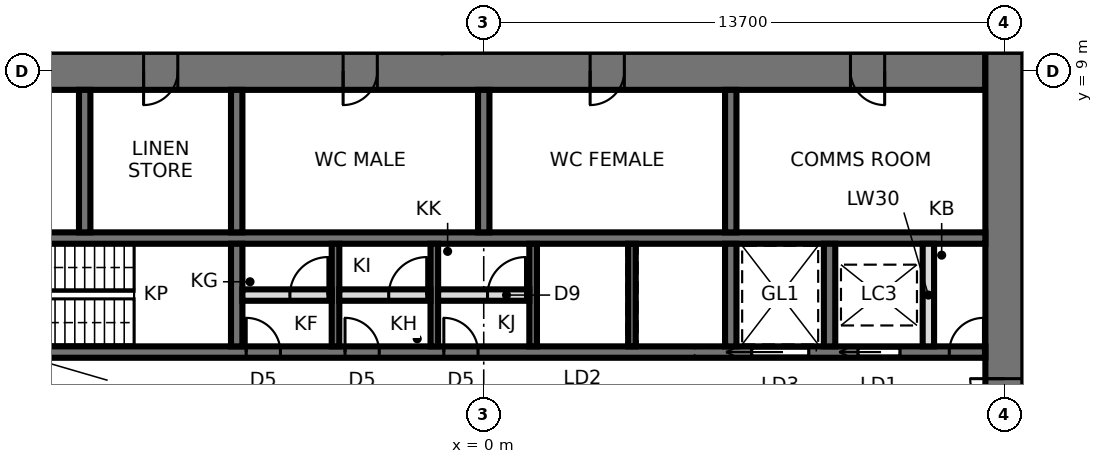
"""IFC4 building model, lengths in metres.
Left out: names, types, materials, properties, quantities, classifications, styles, units other than length and angle.
Written with IfcOpenShell. Run it as: python <this file> out.ifc"""

import sys

from ifc_helpers import new_model, si_unit, direction, frame, frame_2d, origin, place, context, subcontext, project, spatial, rectangle, extrude, element, fill, save


model = new_model("IFC4")
c1 = context("Model", 3, precision=1e-05, world=origin(), true_north=direction((0.0, 1.0)))
c2 = subcontext(c1, "Body", "Model", "MODEL_VIEW")
j1 = project(units=[si_unit("LENGTHUNIT", "METRE"), si_unit("PLANEANGLEUNIT", "RADIAN")], contexts=[c1])
p1 = place(None, origin())
s1 = spatial("IfcSite", under=j1, at=p1, CompositionType="ELEMENT")
p2 = place(p1, origin())
s2 = spatial("IfcBuilding", under=s1, at=p2, CompositionType="ELEMENT")
p3 = place(p2, frame((0.0, 0.0, 187.7)))
s3 = spatial("IfcBuildingStorey", under=s2, at=p3, CompositionType="ELEMENT", Elevation=187.7)
p4 = place(p3, frame((13.2, 9.0, 0.0), z_axis=(0.0, 0.0, 1.0), x_axis=(-1.0, 0.0, 0.0)))
e1 = element("IfcWall", 1, at=p4, inside=s3, PredefinedType="SHEAR", context=c2, shape_type="SweptSolid", body=[
    extrude(rectangle(XDim=26.4, YDim=1.0, at=frame_2d((13.2, 0.0))), origin(), (0.0, 0.0, 1.0), 3.9),
])
p5 = place(p4, frame((2.65, 0.0, 0.0)))
e2 = element("IfcOpeningElement", 2, at=p5, cuts=e1, PredefinedType="OPENING", context=c2, shape_type="SweptSolid", body=[
    extrude(rectangle(XDim=0.9, YDim=2.1, at=frame_2d((0.45, 1.05))), frame((0.0, 0.51, 0.0), z_axis=(0.0, -1.0, 0.0), x_axis=(1.0, 0.0, 0.0)), (0.0, 0.0, 1.0), 1.02),
])
p6 = place(p4, frame((9.5, 0.0, 0.0)))
e3 = element("IfcOpeningElement", 3, at=p6, cuts=e1, PredefinedType="OPENING", context=c2, shape_type="SweptSolid", body=[
    extrude(rectangle(XDim=0.9, YDim=2.1, at=frame_2d((0.45, 1.05))), frame((0.0, 0.51, 0.0), z_axis=(0.0, -1.0, 0.0), x_axis=(1.0, 0.0, 0.0)), (0.0, 0.0, 1.0), 1.02),
])
p7 = place(p4, frame((16.0, 0.0, 0.0)))
e4 = element("IfcOpeningElement", 4, at=p7, cuts=e1, PredefinedType="OPENING", context=c2, shape_type="SweptSolid", body=[
    extrude(rectangle(XDim=0.9, YDim=2.1, at=frame_2d((0.45, 1.05))), frame((0.0, 0.51, 0.0), z_axis=(0.0, -1.0, 0.0), x_axis=(1.0, 0.0, 0.0)), (0.0, 0.0, 1.0), 1.02),
])
p8 = place(p4, frame((21.25, 0.0, 0.0)))
e5 = element("IfcOpeningElement", 5, at=p8, cuts=e1, PredefinedType="OPENING", context=c2, shape_type="SweptSolid", body=[
    extrude(rectangle(XDim=0.9, YDim=2.1, at=frame_2d((0.45, 1.05))), frame((0.0, 0.51, 0.0), z_axis=(0.0, -1.0, 0.0), x_axis=(1.0, 0.0, 0.0)), (0.0, 0.0, 1.0), 1.02),
])
p9 = place(p4, frame((24.8, 0.0, 0.0)))
e6 = element("IfcOpeningElement", 6, at=p9, cuts=e1, PredefinedType="OPENING", context=c2, shape_type="SweptSolid", body=[
    extrude(rectangle(XDim=1.0, YDim=2.1, at=frame_2d((0.5, 1.05))), frame((0.0, 0.51, 0.0), z_axis=(0.0, -1.0, 0.0), x_axis=(1.0, 0.0, 0.0)), (0.0, 0.0, 1.0), 1.02),
])
p10 = place(p3, frame((13.7, -9.5, 0.0), z_axis=(0.0, 0.0, 1.0), x_axis=(0.0, 1.0, 0.0)))
e7 = element("IfcWall", 7, at=p10, inside=s3, PredefinedType="SHEAR", context=c2, shape_type="SweptSolid", body=[
    extrude(rectangle(XDim=19.0, YDim=1.0, at=frame_2d((9.5, 0.0))), origin(), (0.0, 0.0, 1.0), 3.9),
])
p11 = place(p10, frame((8.6, 0.0, 0.0)))
e8 = element("IfcOpeningElement", 8, at=p11, cuts=e7, PredefinedType="OPENING", context=c2, shape_type="SweptSolid", body=[
    extrude(rectangle(XDim=1.8, YDim=2.4, at=frame_2d((0.9, 1.2))), frame((0.0, 0.51, 0.0), z_axis=(0.0, -1.0, 0.0), x_axis=(1.0, 0.0, 0.0)), (0.0, 0.0, 1.0), 1.02),
])
p12 = place(p3, frame((-13.2, 1.6, 0.0), z_axis=(0.0, 0.0, 1.0), x_axis=(1.0, 0.0, 0.0)))
e9 = element("IfcWall", 9, at=p12, inside=s3, PredefinedType="SHEAR", context=c2, shape_type="SweptSolid", body=[
    extrude(rectangle(XDim=26.4, YDim=0.3, at=frame_2d((13.2, 0.0))), origin(), (0.0, 0.0, 1.0), 3.9),
])
p13 = place(p12, frame((0.25, 0.0, 0.0)))
e10 = element("IfcOpeningElement", 10, at=p13, cuts=e9, PredefinedType="OPENING", context=c2, shape_type="SweptSolid", body=[
    extrude(rectangle(XDim=1.0, YDim=2.1, at=frame_2d((0.5, 1.05))), frame((0.0, 0.16, 0.0), z_axis=(0.0, -1.0, 0.0), x_axis=(1.0, 0.0, 0.0)), (0.0, 0.0, 1.0), 0.32),
])
p14 = place(p12, frame((23.05, 0.0, 0.0)))
e11 = element("IfcOpeningElement", 11, at=p14, cuts=e9, PredefinedType="OPENING", context=c2, shape_type="SweptSolid", body=[
    extrude(rectangle(XDim=1.1, YDim=2.3, at=frame_2d((0.55, 1.15))), frame((0.0, 0.16, 0.0), z_axis=(0.0, -1.0, 0.0), x_axis=(1.0, 0.0, 0.0)), (0.0, 0.0, 1.0), 0.32),
])
p15 = place(p12, frame((20.25, 0.0, 0.0)))
e12 = element("IfcOpeningElement", 12, at=p15, cuts=e9, PredefinedType="OPENING", context=c2, shape_type="SweptSolid", body=[
    extrude(rectangle(XDim=1.5, YDim=2.4, at=frame_2d((0.75, 1.2))), frame((0.0, 0.16, 0.0), z_axis=(0.0, -1.0, 0.0), x_axis=(1.0, 0.0, 0.0)), (0.0, 0.0, 1.0), 0.32),
])
p16 = place(p12, frame((6.95, 0.0, 0.0)))
e13 = element("IfcOpeningElement", 13, at=p16, cuts=e9, PredefinedType="OPENING", context=c2, shape_type="SweptSolid", body=[
    extrude(rectangle(XDim=0.9, YDim=2.1, at=frame_2d((0.45, 1.05))), frame((0.0, 0.16, 0.0), z_axis=(0.0, -1.0, 0.0), x_axis=(1.0, 0.0, 0.0)), (0.0, 0.0, 1.0), 0.32),
])
p17 = place(p12, frame((9.55, 0.0, 0.0)))
e14 = element("IfcOpeningElement", 14, at=p17, cuts=e9, PredefinedType="OPENING", context=c2, shape_type="SweptSolid", body=[
    extrude(rectangle(XDim=0.9, YDim=2.1, at=frame_2d((0.45, 1.05))), frame((0.0, 0.16, 0.0), z_axis=(0.0, -1.0, 0.0), x_axis=(1.0, 0.0, 0.0)), (0.0, 0.0, 1.0), 0.32),
])
p18 = place(p12, frame((12.15, 0.0, 0.0)))
e15 = element("IfcOpeningElement", 15, at=p18, cuts=e9, PredefinedType="OPENING", context=c2, shape_type="SweptSolid", body=[
    extrude(rectangle(XDim=0.9, YDim=2.1, at=frame_2d((0.45, 1.05))), frame((0.0, 0.16, 0.0), z_axis=(0.0, -1.0, 0.0), x_axis=(1.0, 0.0, 0.0)), (0.0, 0.0, 1.0), 0.32),
])
p19 = place(p12, frame((25.45, 0.0, 0.0)))
e16 = element("IfcOpeningElement", 16, at=p19, cuts=e9, PredefinedType="OPENING", context=c2, shape_type="SweptSolid", body=[
    extrude(rectangle(XDim=0.9, YDim=2.1, at=frame_2d((0.45, 1.05))), frame((0.0, 0.16, 0.0), z_axis=(0.0, -1.0, 0.0), x_axis=(1.0, 0.0, 0.0)), (0.0, 0.0, 1.0), 0.32),
])
p20 = place(p3, frame((-13.2, 4.6, 0.0), z_axis=(0.0, 0.0, 1.0), x_axis=(1.0, 0.0, 0.0)))
e17 = element("IfcWall", 17, at=p20, inside=s3, PredefinedType="SHEAR", context=c2, shape_type="SweptSolid", body=[
    extrude(rectangle(XDim=26.4, YDim=0.3, at=frame_2d((13.2, 0.0))), origin(), (0.0, 0.0, 1.0), 3.9),
])
p21 = place(p3, frame((-6.5, 1.75, 0.0), z_axis=(0.0, 0.0, 1.0), x_axis=(0.0, 1.0, 0.0)))
e18 = element("IfcWall", 18, at=p21, inside=s3, PredefinedType="SHEAR", context=c2, shape_type="SweptSolid", body=[
    extrude(rectangle(XDim=2.7, YDim=0.3, at=frame_2d((1.35, 0.0))), origin(), (0.0, 0.0, 1.0), 3.9),
])
p22 = place(p3, frame((-6.5, 4.75, 0.0), z_axis=(0.0, 0.0, 1.0), x_axis=(0.0, 1.0, 0.0)))
e19 = element("IfcWall", 19, at=p22, inside=s3, PredefinedType="SHEAR", context=c2, shape_type="SweptSolid", body=[
    extrude(rectangle(XDim=3.75, YDim=0.3, at=frame_2d((1.875, 0.0))), origin(), (0.0, 0.0, 1.0), 3.9),
])
p23 = place(p3, frame((6.5, 1.75, 0.0), z_axis=(0.0, 0.0, 1.0), x_axis=(0.0, 1.0, 0.0)))
e20 = element("IfcWall", 20, at=p23, inside=s3, PredefinedType="SHEAR", context=c2, shape_type="SweptSolid", body=[
    extrude(rectangle(XDim=2.7, YDim=0.3, at=frame_2d((1.35, 0.0))), origin(), (0.0, 0.0, 1.0), 3.9),
])
p24 = place(p3, frame((6.5, 4.75, 0.0), z_axis=(0.0, 0.0, 1.0), x_axis=(0.0, 1.0, 0.0)))
e21 = element("IfcWall", 21, at=p24, inside=s3, PredefinedType="SHEAR", context=c2, shape_type="SweptSolid", body=[
    extrude(rectangle(XDim=3.75, YDim=0.3, at=frame_2d((1.875, 0.0))), origin(), (0.0, 0.0, 1.0), 3.9),
])
for number, where, z_axis, x_axis in (
    (22, (-3.9, 1.75, 0.0), (0.0, 0.0, 1.0), (0.0, 1.0, 0.0)),
    (23, (-1.3, 1.75, 0.0), (0.0, 0.0, 1.0), (0.0, 1.0, 0.0)),
    (24, (1.3, 1.75, 0.0), (0.0, 0.0, 1.0), (0.0, 1.0, 0.0)),
    (25, (3.9, 1.75, 0.0), (0.0, 0.0, 1.0), (0.0, 1.0, 0.0)),
):
    element("IfcWall", number, at=place(p3, frame(where, z_axis=z_axis, x_axis=x_axis)), inside=s3, PredefinedType="SHEAR", context=c2, shape_type="SweptSolid", body=[
        extrude(rectangle(XDim=2.7, YDim=0.2, at=frame_2d((1.35, 0.0))), origin(), (0.0, 0.0, 1.0), 3.9),
    ])
for number, where, z_axis, x_axis in (
    (26, (0.0, 4.75, 0.0), (0.0, 0.0, 1.0), (0.0, 1.0, 0.0)),
    (27, (-10.5, 4.75, 0.0), (0.0, 0.0, 1.0), (0.0, 1.0, 0.0)),
):
    element("IfcWall", number, at=place(p3, frame(where, z_axis=z_axis, x_axis=x_axis)), inside=s3, PredefinedType="SHEAR", context=c2, shape_type="SweptSolid", body=[
        extrude(rectangle(XDim=3.75, YDim=0.3, at=frame_2d((1.875, 0.0))), origin(), (0.0, 0.0, 1.0), 3.9),
    ])
p25 = place(p3, frame((9.1, 1.75, 0.0), z_axis=(0.0, 0.0, 1.0), x_axis=(0.0, 1.0, 0.0)))
e28 = element("IfcWall", 28, at=p25, inside=s3, PredefinedType="SHEAR", context=c2, shape_type="SweptSolid", body=[
    extrude(rectangle(XDim=2.7, YDim=0.3, at=frame_2d((1.35, 0.0))), origin(), (0.0, 0.0, 1.0), 3.9),
])
p26 = place(p3, frame((-6.35, 3.1, 0.0), z_axis=(0.0, 0.0, 1.0), x_axis=(1.0, 0.0, 0.0)))
e29 = element("IfcWall", 29, at=p26, inside=s3, PredefinedType="PARTITIONING", context=c2, shape_type="SweptSolid", body=[
    extrude(rectangle(XDim=2.35, YDim=0.3, at=frame_2d((1.175, 0.0))), origin(), (0.0, 0.0, 1.0), 3.74),
])
p27 = place(p26, frame((1.25, 0.0, 0.0)))
e30 = element("IfcOpeningElement", 30, at=p27, cuts=e29, PredefinedType="OPENING", context=c2, shape_type="SweptSolid", body=[
    extrude(rectangle(XDim=1.0, YDim=2.4, at=frame_2d((0.5, 1.2))), frame((0.0, 0.16, 0.0), z_axis=(0.0, -1.0, 0.0), x_axis=(1.0, 0.0, 0.0)), (0.0, 0.0, 1.0), 0.32),
])
p28 = place(p3, frame((-3.8, 3.1, 0.0), z_axis=(0.0, 0.0, 1.0), x_axis=(1.0, 0.0, 0.0)))
e31 = element("IfcWall", 31, at=p28, inside=s3, PredefinedType="PARTITIONING", context=c2, shape_type="SweptSolid", body=[
    extrude(rectangle(XDim=2.4, YDim=0.3, at=frame_2d((1.2, 0.0))), origin(), (0.0, 0.0, 1.0), 3.74),
])
p29 = place(p28, frame((1.3, 0.0, 0.0)))
e32 = element("IfcOpeningElement", 32, at=p29, cuts=e31, PredefinedType="OPENING", context=c2, shape_type="SweptSolid", body=[
    extrude(rectangle(XDim=1.0, YDim=2.4, at=frame_2d((0.5, 1.2))), frame((0.0, 0.16, 0.0), z_axis=(0.0, -1.0, 0.0), x_axis=(1.0, 0.0, 0.0)), (0.0, 0.0, 1.0), 0.32),
])
p30 = place(p3, frame((-1.2, 3.1, 0.0), z_axis=(0.0, 0.0, 1.0), x_axis=(1.0, 0.0, 0.0)))
e33 = element("IfcWall", 33, at=p30, inside=s3, PredefinedType="PARTITIONING", context=c2, shape_type="SweptSolid", body=[
    extrude(rectangle(XDim=2.4, YDim=0.3, at=frame_2d((1.2, 0.0))), origin(), (0.0, 0.0, 1.0), 3.74),
])
p31 = place(p30, frame((1.3, 0.0, 0.0)))
e34 = element("IfcOpeningElement", 34, at=p31, cuts=e33, PredefinedType="OPENING", context=c2, shape_type="SweptSolid", body=[
    extrude(rectangle(XDim=1.0, YDim=2.4, at=frame_2d((0.5, 1.2))), frame((0.0, 0.16, 0.0), z_axis=(0.0, -1.0, 0.0), x_axis=(1.0, 0.0, 0.0)), (0.0, 0.0, 1.0), 0.32),
])
p32 = place(p3, frame((11.7, 1.75, 0.0), z_axis=(0.0, 0.0, 1.0), x_axis=(0.0, 1.0, 0.0)))
e35 = element("IfcWall", 35, at=p32, inside=s3, PredefinedType="SOLIDWALL", context=c2, shape_type="SweptSolid", body=[
    extrude(rectangle(XDim=2.7, YDim=0.3, at=frame_2d((1.35, 0.0))), origin(), (0.0, 0.0, 1.0), 3.74),
])
p33 = place(p3, frame((-0.999, 9.5, 0.0), z_axis=(0.0, 0.0, 1.0), x_axis=(-0.10451834001, 0.994522959313, 0.0)))
e36 = element("IfcWall", 36, at=p33, inside=s3, PredefinedType="PARTITIONING", context=c2, shape_type="SweptSolid", body=[
    extrude(rectangle(XDim=10.766, YDim=0.12, at=frame_2d((5.383, 0.0))), origin(), (0.0, 0.0, 1.0), 3.74),
])
p34 = place(p11, origin())
e37 = element("IfcDoor", 37, at=p34, inside=s3, OperationType="DOUBLE_DOOR_SINGLE_SWING", PredefinedType="DOOR", context=c2, shape_type="SweptSolid", body=[
    extrude(rectangle(XDim=1.72, YDim=2.36, at=frame_2d((0.9, 1.18))), frame((0.0, 0.025, 0.0), z_axis=(0.0, -1.0, 0.0), x_axis=(1.0, 0.0, 0.0)), (0.0, 0.0, 1.0), 0.05),
    extrude(rectangle(XDim=0.04, YDim=2.4, at=frame_2d((0.02, 1.2))), frame((0.0, 0.25, 0.0), z_axis=(0.0, -1.0, 0.0), x_axis=(1.0, 0.0, 0.0)), (0.0, 0.0, 1.0), 0.5),
    extrude(rectangle(XDim=0.04, YDim=2.4, at=frame_2d((1.78, 1.2))), frame((0.0, 0.25, 0.0), z_axis=(0.0, -1.0, 0.0), x_axis=(1.0, 0.0, 0.0)), (0.0, 0.0, 1.0), 0.5),
    extrude(rectangle(XDim=1.72, YDim=0.04, at=frame_2d((0.9, 2.38))), frame((0.0, 0.25, 0.0), z_axis=(0.0, -1.0, 0.0), x_axis=(1.0, 0.0, 0.0)), (0.0, 0.0, 1.0), 0.5),
])
fill(e8, e37)
p35 = place(p14, origin())
e38 = element("IfcDoor", 38, at=p35, inside=s3, OperationType="SLIDING_TO_LEFT", PredefinedType="DOOR", context=c2, shape_type="SweptSolid", body=[
    extrude(rectangle(XDim=1.1, YDim=2.3, at=frame_2d((0.55, 1.15))), frame((0.0, 0.025, 0.0), z_axis=(0.0, -1.0, 0.0), x_axis=(1.0, 0.0, 0.0)), (0.0, 0.0, 1.0), 0.05),
])
fill(e11, e38)
p36 = place(p15, origin())
e39 = element("IfcDoor", 39, at=p36, inside=s3, OperationType="SLIDING_TO_LEFT", PredefinedType="DOOR", context=c2, shape_type="SweptSolid", body=[
    extrude(rectangle(XDim=1.5, YDim=2.4, at=frame_2d((0.75, 1.2))), frame((0.0, 0.025, 0.0), z_axis=(0.0, -1.0, 0.0), x_axis=(1.0, 0.0, 0.0)), (0.0, 0.0, 1.0), 0.05),
])
fill(e12, e39)
p37 = place(p27, origin())
e40 = element("IfcDoor", 40, at=p37, inside=s3, OperationType="SINGLE_SWING_RIGHT", PredefinedType="DOOR", context=c2, shape_type="SweptSolid", body=[
    extrude(rectangle(XDim=1.0, YDim=2.4, at=frame_2d((0.5, 1.2))), frame((0.0, 0.025, 0.0), z_axis=(0.0, -1.0, 0.0), x_axis=(1.0, 0.0, 0.0)), (0.0, 0.0, 1.0), 0.05),
])
fill(e30, e40)
p38 = place(p16, origin())
e41 = element("IfcDoor", 41, at=p38, inside=s3, OperationType="SINGLE_SWING_LEFT", PredefinedType="DOOR", context=c2, shape_type="SweptSolid", body=[
    extrude(rectangle(XDim=0.9, YDim=2.1, at=frame_2d((0.45, 1.05))), frame((0.0, 0.025, 0.0), z_axis=(0.0, -1.0, 0.0), x_axis=(1.0, 0.0, 0.0)), (0.0, 0.0, 1.0), 0.05),
])
fill(e13, e41)
p39 = place(p29, origin())
e42 = element("IfcDoor", 42, at=p39, inside=s3, OperationType="SINGLE_SWING_RIGHT", PredefinedType="DOOR", context=c2, shape_type="SweptSolid", body=[
    extrude(rectangle(XDim=1.0, YDim=2.4, at=frame_2d((0.5, 1.2))), frame((0.0, 0.025, 0.0), z_axis=(0.0, -1.0, 0.0), x_axis=(1.0, 0.0, 0.0)), (0.0, 0.0, 1.0), 0.05),
])
fill(e32, e42)
p40 = place(p17, origin())
e43 = element("IfcDoor", 43, at=p40, inside=s3, OperationType="SINGLE_SWING_LEFT", PredefinedType="DOOR", context=c2, shape_type="SweptSolid", body=[
    extrude(rectangle(XDim=0.9, YDim=2.1, at=frame_2d((0.45, 1.05))), frame((0.0, 0.025, 0.0), z_axis=(0.0, -1.0, 0.0), x_axis=(1.0, 0.0, 0.0)), (0.0, 0.0, 1.0), 0.05),
])
fill(e14, e43)
p41 = place(p31, origin())
e44 = element("IfcDoor", 44, at=p41, inside=s3, OperationType="SINGLE_SWING_RIGHT", PredefinedType="DOOR", context=c2, shape_type="SweptSolid", body=[
    extrude(rectangle(XDim=1.0, YDim=2.4, at=frame_2d((0.5, 1.2))), frame((0.0, 0.025, 0.0), z_axis=(0.0, -1.0, 0.0), x_axis=(1.0, 0.0, 0.0)), (0.0, 0.0, 1.0), 0.05),
])
fill(e34, e44)
p42 = place(p18, origin())
e45 = element("IfcDoor", 45, at=p42, inside=s3, OperationType="SINGLE_SWING_LEFT", PredefinedType="DOOR", context=c2, shape_type="SweptSolid", body=[
    extrude(rectangle(XDim=0.9, YDim=2.1, at=frame_2d((0.45, 1.05))), frame((0.0, 0.025, 0.0), z_axis=(0.0, -1.0, 0.0), x_axis=(1.0, 0.0, 0.0)), (0.0, 0.0, 1.0), 0.05),
])
fill(e15, e45)
p43 = place(p19, origin())
e46 = element("IfcDoor", 46, at=p43, inside=s3, OperationType="SINGLE_SWING_RIGHT", PredefinedType="DOOR", context=c2, shape_type="SweptSolid", body=[
    extrude(rectangle(XDim=0.9, YDim=2.1, at=frame_2d((0.45, 1.05))), frame((0.0, 0.025, 0.0), z_axis=(0.0, -1.0, 0.0), x_axis=(1.0, 0.0, 0.0)), (0.0, 0.0, 1.0), 0.05),
])
fill(e16, e46)
p44 = place(p5, origin())
e47 = element("IfcDoor", 47, at=p44, inside=s3, OperationType="SINGLE_SWING_LEFT", PredefinedType="DOOR", context=c2, shape_type="SweptSolid", body=[
    extrude(rectangle(XDim=0.82, YDim=2.06, at=frame_2d((0.45, 1.03))), frame((0.0, 0.025, 0.0), z_axis=(0.0, -1.0, 0.0), x_axis=(1.0, 0.0, 0.0)), (0.0, 0.0, 1.0), 0.05),
    extrude(rectangle(XDim=0.04, YDim=2.1, at=frame_2d((0.02, 1.05))), frame((0.0, 0.25, 0.0), z_axis=(0.0, -1.0, 0.0), x_axis=(1.0, 0.0, 0.0)), (0.0, 0.0, 1.0), 0.5),
    extrude(rectangle(XDim=0.04, YDim=2.1, at=frame_2d((0.88, 1.05))), frame((0.0, 0.25, 0.0), z_axis=(0.0, -1.0, 0.0), x_axis=(1.0, 0.0, 0.0)), (0.0, 0.0, 1.0), 0.5),
    extrude(rectangle(XDim=0.82, YDim=0.04, at=frame_2d((0.45, 2.08))), frame((0.0, 0.25, 0.0), z_axis=(0.0, -1.0, 0.0), x_axis=(1.0, 0.0, 0.0)), (0.0, 0.0, 1.0), 0.5),
])
fill(e2, e47)
p45 = place(p6, origin())
e48 = element("IfcDoor", 48, at=p45, inside=s3, OperationType="SINGLE_SWING_RIGHT", PredefinedType="DOOR", context=c2, shape_type="SweptSolid", body=[
    extrude(rectangle(XDim=0.82, YDim=2.06, at=frame_2d((0.45, 1.03))), frame((0.0, 0.025, 0.0), z_axis=(0.0, -1.0, 0.0), x_axis=(1.0, 0.0, 0.0)), (0.0, 0.0, 1.0), 0.05),
    extrude(rectangle(XDim=0.04, YDim=2.1, at=frame_2d((0.02, 1.05))), frame((0.0, 0.25, 0.0), z_axis=(0.0, -1.0, 0.0), x_axis=(1.0, 0.0, 0.0)), (0.0, 0.0, 1.0), 0.5),
    extrude(rectangle(XDim=0.04, YDim=2.1, at=frame_2d((0.88, 1.05))), frame((0.0, 0.25, 0.0), z_axis=(0.0, -1.0, 0.0), x_axis=(1.0, 0.0, 0.0)), (0.0, 0.0, 1.0), 0.5),
    extrude(rectangle(XDim=0.82, YDim=0.04, at=frame_2d((0.45, 2.08))), frame((0.0, 0.25, 0.0), z_axis=(0.0, -1.0, 0.0), x_axis=(1.0, 0.0, 0.0)), (0.0, 0.0, 1.0), 0.5),
])
fill(e3, e48)
p46 = place(p7, origin())
e49 = element("IfcDoor", 49, at=p46, inside=s3, OperationType="SINGLE_SWING_RIGHT", PredefinedType="DOOR", context=c2, shape_type="SweptSolid", body=[
    extrude(rectangle(XDim=0.82, YDim=2.06, at=frame_2d((0.45, 1.03))), frame((0.0, 0.025, 0.0), z_axis=(0.0, -1.0, 0.0), x_axis=(1.0, 0.0, 0.0)), (0.0, 0.0, 1.0), 0.05),
    extrude(rectangle(XDim=0.04, YDim=2.1, at=frame_2d((0.02, 1.05))), frame((0.0, 0.25, 0.0), z_axis=(0.0, -1.0, 0.0), x_axis=(1.0, 0.0, 0.0)), (0.0, 0.0, 1.0), 0.5),
    extrude(rectangle(XDim=0.04, YDim=2.1, at=frame_2d((0.88, 1.05))), frame((0.0, 0.25, 0.0), z_axis=(0.0, -1.0, 0.0), x_axis=(1.0, 0.0, 0.0)), (0.0, 0.0, 1.0), 0.5),
    extrude(rectangle(XDim=0.82, YDim=0.04, at=frame_2d((0.45, 2.08))), frame((0.0, 0.25, 0.0), z_axis=(0.0, -1.0, 0.0), x_axis=(1.0, 0.0, 0.0)), (0.0, 0.0, 1.0), 0.5),
])
fill(e4, e49)
p47 = place(p8, origin())
e50 = element("IfcDoor", 50, at=p47, inside=s3, OperationType="SINGLE_SWING_RIGHT", PredefinedType="DOOR", context=c2, shape_type="SweptSolid", body=[
    extrude(rectangle(XDim=0.82, YDim=2.06, at=frame_2d((0.45, 1.03))), frame((0.0, 0.025, 0.0), z_axis=(0.0, -1.0, 0.0), x_axis=(1.0, 0.0, 0.0)), (0.0, 0.0, 1.0), 0.05),
    extrude(rectangle(XDim=0.04, YDim=2.1, at=frame_2d((0.02, 1.05))), frame((0.0, 0.25, 0.0), z_axis=(0.0, -1.0, 0.0), x_axis=(1.0, 0.0, 0.0)), (0.0, 0.0, 1.0), 0.5),
    extrude(rectangle(XDim=0.04, YDim=2.1, at=frame_2d((0.88, 1.05))), frame((0.0, 0.25, 0.0), z_axis=(0.0, -1.0, 0.0), x_axis=(1.0, 0.0, 0.0)), (0.0, 0.0, 1.0), 0.5),
    extrude(rectangle(XDim=0.82, YDim=0.04, at=frame_2d((0.45, 2.08))), frame((0.0, 0.25, 0.0), z_axis=(0.0, -1.0, 0.0), x_axis=(1.0, 0.0, 0.0)), (0.0, 0.0, 1.0), 0.5),
])
fill(e5, e50)
save(model, sys.argv[1])
